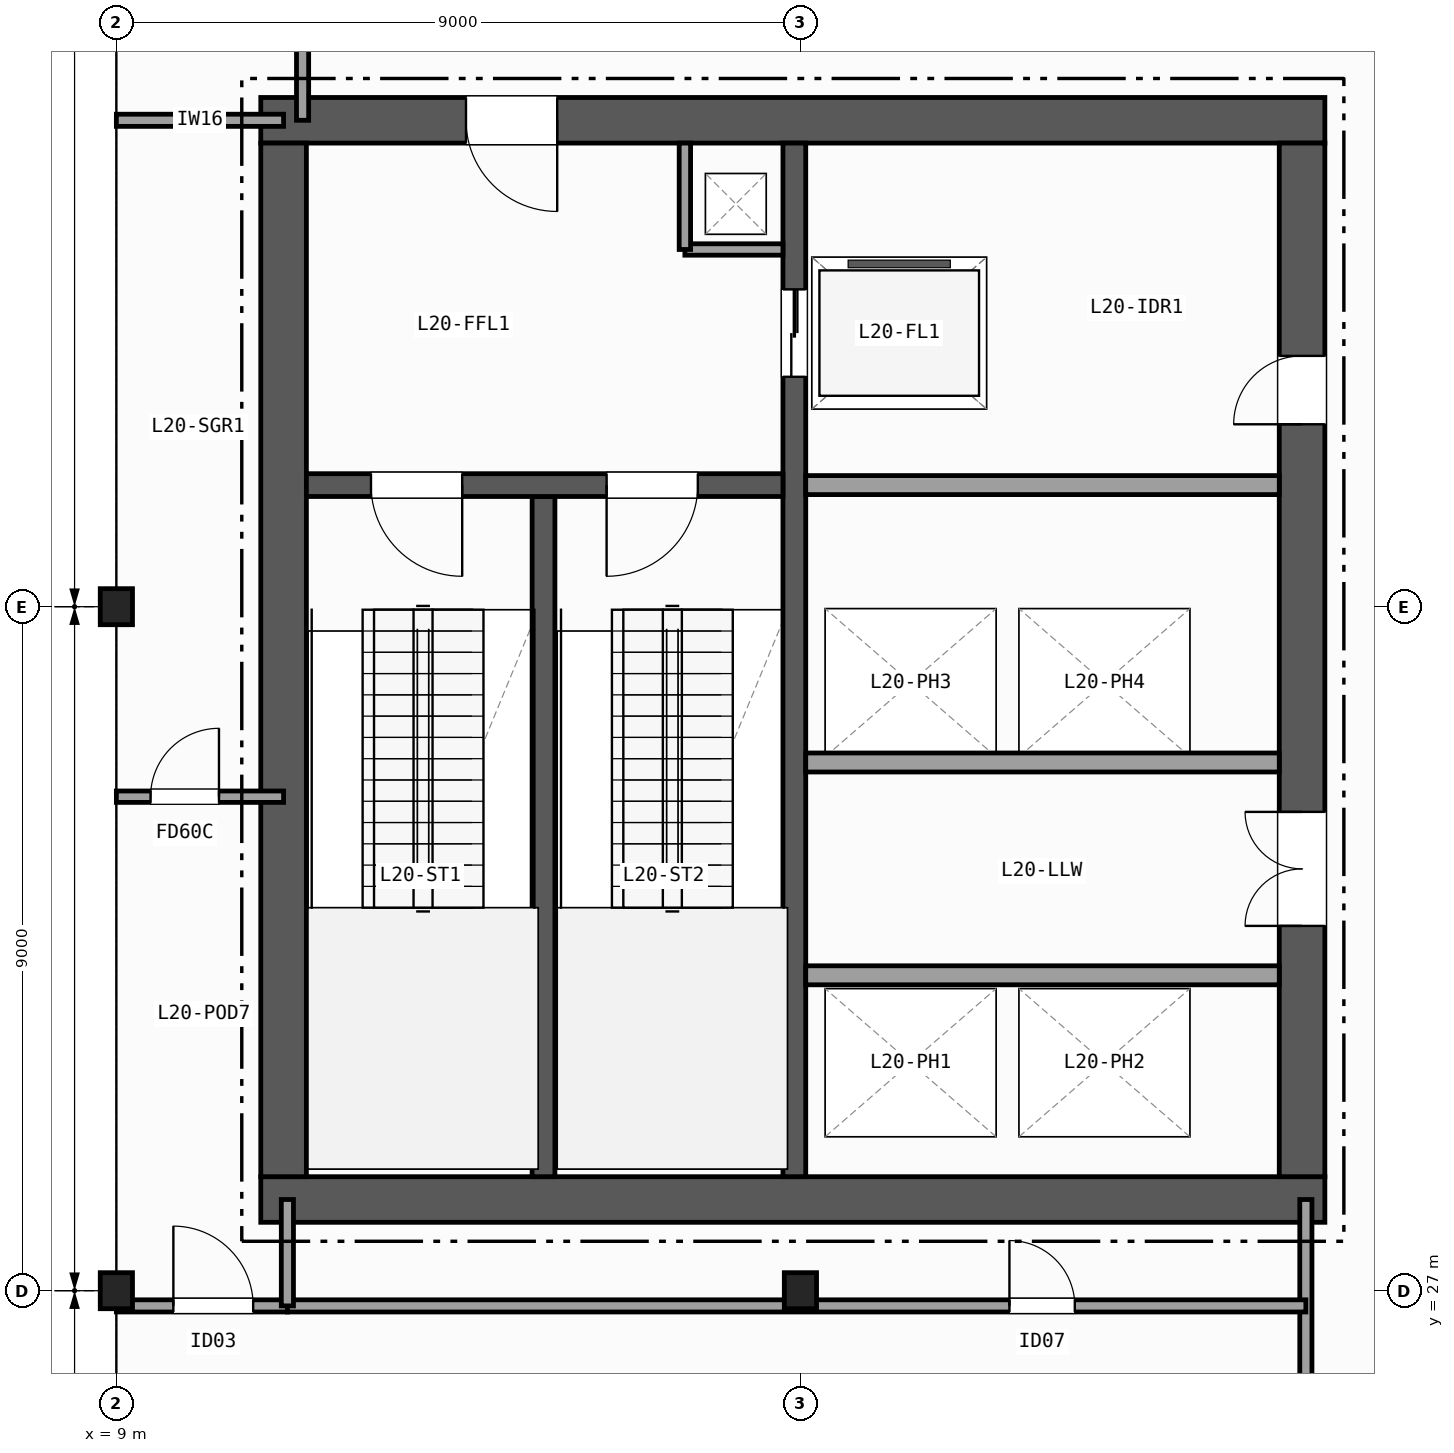
"""IFC4 building model, lengths in metres.
Left out: names, types, materials, properties, quantities, classifications, styles, units other than length and angle.
Written with IfcOpenShell. Run it as: python <this file> out.ifc"""

import sys

from ifc_helpers import new_model, si_unit, direction, frame, frame_2d, origin, origin_2d, place, context, subcontext, project, spatial, rectangle, i_section, extrude, element, fill, save


model = new_model("IFC4")
c1 = context("Model", 3, precision=1e-05, world=origin(), true_north=direction((0.0, 1.0)))
c2 = subcontext(c1, "Body", "Model", "MODEL_VIEW")
j1 = project(units=[si_unit("LENGTHUNIT", "METRE"), si_unit("PLANEANGLEUNIT", "RADIAN")], contexts=[c1])
p1 = place(None, origin())
s1 = spatial("IfcSite", under=j1, at=p1, CompositionType="ELEMENT")
p2 = place(p1, origin())
s2 = spatial("IfcBuilding", under=s1, at=p2, CompositionType="ELEMENT")
p3 = place(p2, frame((0.0, 0.0, 84.1)))
s3 = spatial("IfcBuildingStorey", under=s2, at=p3, CompositionType="ELEMENT", Elevation=84.1)
for number, where, z_axis, x_axis in (
    (1, (9.0, 27.0, 0.0), (0.0, 0.0, 1.0), (1.0, 0.0, 0.0)),
    (2, (9.0, 36.0, 0.0), (0.0, 0.0, 1.0), (1.0, 0.0, 0.0)),
    (3, (18.0, 27.0, 0.0), (0.0, 0.0, 1.0), (1.0, 0.0, 0.0)),
):
    element("IfcColumn", number, at=place(p3, frame(where, z_axis=z_axis, x_axis=x_axis)), inside=s3, PredefinedType="COLUMN", context=c2, shape_type="SweptSolid", body=[
        extrude(i_section(OverallWidth=0.424, OverallDepth=0.474, WebThickness=0.048, FlangeThickness=0.077, FilletRadius=0.015, at=origin_2d()), origin(), (0.0, 0.0, 1.0), 5.0),
    ])
p4 = place(p3, frame((10.9, 28.2, 0.0), z_axis=(0.0, 0.0, 1.0), x_axis=(1.0, 0.0, 0.0)))
e4 = element("IfcWall", 4, at=p4, inside=s3, PredefinedType="SHEAR", context=c2, shape_type="SweptSolid", body=[
    extrude(rectangle(XDim=14.0, YDim=0.6, at=frame_2d((7.0, 0.0))), origin(), (0.0, 0.0, 1.0), 4.72),
])
p5 = place(p3, frame((24.9, 42.4, 0.0), z_axis=(0.0, 0.0, 1.0), x_axis=(-1.0, 0.0, 0.0)))
e5 = element("IfcWall", 5, at=p5, inside=s3, PredefinedType="SHEAR", context=c2, shape_type="SweptSolid", body=[
    extrude(rectangle(XDim=14.0, YDim=0.6, at=frame_2d((7.0, 0.0))), origin(), (0.0, 0.0, 1.0), 4.72),
])
p6 = place(p5, frame((10.1, 0.0, 0.0)))
e6 = element("IfcOpeningElement", 6, at=p6, cuts=e5, PredefinedType="OPENING", context=c2, shape_type="SweptSolid", body=[
    extrude(rectangle(XDim=1.2, YDim=2.15, at=frame_2d((0.6, 1.075))), frame((0.0, 0.31, 0.0), z_axis=(0.0, -1.0, 0.0), x_axis=(1.0, 0.0, 0.0)), (0.0, 0.0, 1.0), 0.62),
])
p7 = place(p3, frame((11.2, 42.1, 0.0), z_axis=(0.0, 0.0, 1.0), x_axis=(0.0, -1.0, 0.0)))
e7 = element("IfcWall", 7, at=p7, inside=s3, PredefinedType="SHEAR", context=c2, shape_type="SweptSolid", body=[
    extrude(rectangle(XDim=13.6, YDim=0.6, at=frame_2d((6.8, 0.0))), origin(), (0.0, 0.0, 1.0), 4.72),
])
p8 = place(p3, frame((24.6, 28.5, 0.0), z_axis=(0.0, 0.0, 1.0), x_axis=(0.0, 1.0, 0.0)))
e8 = element("IfcWall", 8, at=p8, inside=s3, PredefinedType="SHEAR", context=c2, shape_type="SweptSolid", body=[
    extrude(rectangle(XDim=13.6, YDim=0.6, at=frame_2d((6.8, 0.0))), origin(), (0.0, 0.0, 1.0), 4.72),
])
p9 = place(p8, frame((3.3, 0.0, 0.0)))
e9 = element("IfcOpeningElement", 9, at=p9, cuts=e8, PredefinedType="OPENING", context=c2, shape_type="SweptSolid", body=[
    extrude(rectangle(XDim=1.5, YDim=2.2, at=frame_2d((0.75, 1.1))), frame((0.0, 0.31, 0.0), z_axis=(0.0, -1.0, 0.0), x_axis=(1.0, 0.0, 0.0)), (0.0, 0.0, 1.0), 0.62),
])
p10 = place(p8, frame((9.9, 0.0, 0.0)))
e10 = element("IfcOpeningElement", 10, at=p10, cuts=e8, PredefinedType="OPENING", context=c2, shape_type="SweptSolid", body=[
    extrude(rectangle(XDim=0.9, YDim=2.1, at=frame_2d((0.45, 1.05))), frame((0.0, 0.31, 0.0), z_axis=(0.0, -1.0, 0.0), x_axis=(1.0, 0.0, 0.0)), (0.0, 0.0, 1.0), 0.62),
])
p11 = place(p3, frame((14.62, 28.5, 0.0), z_axis=(0.0, 0.0, 1.0), x_axis=(0.0, 1.0, 0.0)))
e11 = element("IfcWall", 11, at=p11, inside=s3, PredefinedType="SHEAR", context=c2, shape_type="SweptSolid", body=[
    extrude(rectangle(XDim=8.95, YDim=0.3, at=frame_2d((4.475, 0.0))), origin(), (0.0, 0.0, 1.0), 4.72),
])
p12 = place(p3, frame((17.92, 42.1, 0.0), z_axis=(0.0, 0.0, 1.0), x_axis=(0.0, -1.0, 0.0)))
e12 = element("IfcWall", 12, at=p12, inside=s3, PredefinedType="SHEAR", context=c2, shape_type="SweptSolid", body=[
    extrude(rectangle(XDim=13.6, YDim=0.3, at=frame_2d((6.8, 0.0))), origin(), (0.0, 0.0, 1.0), 4.72),
])
p13 = place(p12, frame((1.925, 0.0, 0.0)))
e13 = element("IfcOpeningElement", 13, at=p13, cuts=e12, PredefinedType="OPENING", context=c2, shape_type="SweptSolid", body=[
    extrude(rectangle(XDim=1.15, YDim=2.15, at=frame_2d((0.575, 1.075))), frame((0.0, 0.16, 0.0), z_axis=(0.0, -1.0, 0.0), x_axis=(1.0, 0.0, 0.0)), (0.0, 0.0, 1.0), 0.32),
])
p14 = place(p3, frame((17.77, 37.6, 0.0), z_axis=(0.0, 0.0, 1.0), x_axis=(-1.0, 0.0, 0.0)))
e14 = element("IfcWall", 14, at=p14, inside=s3, PredefinedType="SHEAR", context=c2, shape_type="SweptSolid", body=[
    extrude(rectangle(XDim=6.27, YDim=0.3, at=frame_2d((3.135, 0.0))), origin(), (0.0, 0.0, 1.0), 4.72),
])
p15 = place(p14, frame((4.22, 0.0, 0.0)))
e15 = element("IfcOpeningElement", 15, at=p15, cuts=e14, PredefinedType="OPENING", context=c2, shape_type="SweptSolid", body=[
    extrude(rectangle(XDim=1.2, YDim=2.15, at=frame_2d((0.6, 1.075))), frame((0.0, 0.16, 0.0), z_axis=(0.0, -1.0, 0.0), x_axis=(1.0, 0.0, 0.0)), (0.0, 0.0, 1.0), 0.32),
])
p16 = place(p14, frame((1.12, 0.0, 0.0)))
e16 = element("IfcOpeningElement", 16, at=p16, cuts=e14, PredefinedType="OPENING", context=c2, shape_type="SweptSolid", body=[
    extrude(rectangle(XDim=1.2, YDim=2.15, at=frame_2d((0.6, 1.075))), frame((0.0, 0.16, 0.0), z_axis=(0.0, -1.0, 0.0), x_axis=(1.0, 0.0, 0.0)), (0.0, 0.0, 1.0), 0.32),
])
p17 = place(p3, frame((16.48, 40.7, 0.0), z_axis=(0.0, 0.0, 1.0), x_axis=(1.0, 0.0, 0.0)))
e17 = element("IfcWall", 17, at=p17, inside=s3, PredefinedType="PARTITIONING", context=c2, shape_type="SweptSolid", body=[
    extrude(rectangle(XDim=1.29, YDim=0.15, at=frame_2d((0.645, 0.0))), origin(), (0.0, 0.0, 1.0), 4.72),
])
p18 = place(p3, frame((16.48, 40.7, 0.0), z_axis=(0.0, 0.0, 1.0), x_axis=(0.0, 1.0, 0.0)))
e18 = element("IfcWall", 18, at=p18, inside=s3, PredefinedType="PARTITIONING", context=c2, shape_type="SweptSolid", body=[
    extrude(rectangle(XDim=1.4, YDim=0.15, at=frame_2d((0.7, 0.0))), origin(), (0.0, 0.0, 1.0), 4.72),
])
for number, where, z_axis, x_axis in (
    (19, (18.07, 37.6, 0.0), (0.0, 0.0, 1.0), (1.0, 0.0, 0.0)),
    (20, (18.07, 31.15, 0.0), (0.0, 0.0, 1.0), (1.0, 0.0, 0.0)),
    (21, (24.3, 33.95, 0.0), (0.0, 0.0, 1.0), (-1.0, 0.0, 0.0)),
):
    element("IfcWall", number, at=place(p3, frame(where, z_axis=z_axis, x_axis=x_axis)), inside=s3, PredefinedType="PARTITIONING", context=c2, shape_type="SweptSolid", body=[
        extrude(rectangle(XDim=6.23, YDim=0.25, at=frame_2d((3.115, 0.0))), origin(), (0.0, 0.0, 1.0), 4.72),
    ])
p19 = place(p3, frame((9.0, 26.8, 0.0), z_axis=(0.0, 0.0, 1.0), x_axis=(1.0, 0.0, 0.0)))
e22 = element("IfcWall", 22, at=p19, inside=s3, PredefinedType="PARTITIONING", context=c2, shape_type="SweptSolid", body=[
    extrude(rectangle(XDim=2.25, YDim=0.16, at=frame_2d((1.125, 0.0))), origin(), (0.0, 0.0, 1.0), 3.927),
])
p20 = place(p19, frame((0.75, 0.0, 0.0)))
e23 = element("IfcOpeningElement", 23, at=p20, cuts=e22, PredefinedType="OPENING", context=c2, shape_type="SweptSolid", body=[
    extrude(rectangle(XDim=1.05, YDim=2.15, at=frame_2d((0.525, 1.075))), frame((0.0, 0.09, 0.0), z_axis=(0.0, -1.0, 0.0), x_axis=(1.0, 0.0, 0.0)), (0.0, 0.0, 1.0), 0.18),
])
p21 = place(p3, frame((9.0, 42.4, 0.0), z_axis=(0.0, 0.0, 1.0), x_axis=(1.0, 0.0, 0.0)))
e24 = element("IfcWall", 24, at=p21, inside=s3, PredefinedType="PARTITIONING", context=c2, shape_type="SweptSolid", body=[
    extrude(rectangle(XDim=2.2, YDim=0.16, at=frame_2d((1.1, 0.0))), origin(), (0.0, 0.0, 1.0), 3.927),
])
p22 = place(p3, frame((11.45, 42.4, 0.0), z_axis=(0.0, 0.0, 1.0), x_axis=(0.0, 1.0, 0.0)))
e25 = element("IfcWall", 25, at=p22, inside=s3, PredefinedType="PARTITIONING", context=c2, shape_type="SweptSolid", body=[
    extrude(rectangle(XDim=2.1, YDim=0.16, at=frame_2d((1.05, 0.0))), origin(), (0.0, 0.0, 1.0), 4.72),
])
p23 = place(p3, frame((9.0, 33.5, 0.0), z_axis=(0.0, 0.0, 1.0), x_axis=(1.0, 0.0, 0.0)))
e26 = element("IfcWall", 26, at=p23, inside=s3, PredefinedType="PARTITIONING", context=c2, shape_type="SweptSolid", body=[
    extrude(rectangle(XDim=2.2, YDim=0.15, at=frame_2d((1.1, 0.0))), origin(), (0.0, 0.0, 1.0), 3.927),
])
p24 = place(p23, frame((0.45, 0.0, 0.0)))
e27 = element("IfcOpeningElement", 27, at=p24, cuts=e26, PredefinedType="OPENING", context=c2, shape_type="SweptSolid", body=[
    extrude(rectangle(XDim=0.9, YDim=2.1, at=frame_2d((0.45, 1.05))), frame((0.0, 0.085, 0.0), z_axis=(0.0, -1.0, 0.0), x_axis=(1.0, 0.0, 0.0)), (0.0, 0.0, 1.0), 0.17),
])
p25 = place(p3, frame((24.65, 9.0, 0.0), z_axis=(0.0, 0.0, 1.0), x_axis=(0.0, 1.0, 0.0)))
e28 = element("IfcWall", 28, at=p25, inside=s3, PredefinedType="PARTITIONING", context=c2, shape_type="SweptSolid", body=[
    extrude(rectangle(XDim=19.2, YDim=0.16, at=frame_2d((9.6, 0.0))), origin(), (0.0, 0.0, 1.0), 3.927),
])
p26 = place(p25, frame((12.2, 0.0, 0.0)))
e29 = element("IfcOpeningElement", 29, at=p26, cuts=e28, PredefinedType="OPENING", context=c2, shape_type="SweptSolid", body=[
    extrude(rectangle(XDim=0.95, YDim=2.1, at=frame_2d((0.475, 1.05))), frame((0.0, 0.09, 0.0), z_axis=(0.0, -1.0, 0.0), x_axis=(1.0, 0.0, 0.0)), (0.0, 0.0, 1.0), 0.18),
])
p27 = place(p25, frame((4.2, 0.0, 0.0)))
e30 = element("IfcOpeningElement", 30, at=p27, cuts=e28, PredefinedType="OPENING", context=c2, shape_type="SweptSolid", body=[
    extrude(rectangle(XDim=1.0, YDim=2.1, at=frame_2d((0.5, 1.05))), frame((0.0, 0.09, 0.0), z_axis=(0.0, -1.0, 0.0), x_axis=(1.0, 0.0, 0.0)), (0.0, 0.0, 1.0), 0.18),
])
p28 = place(p3, frame((11.25, 26.8, 0.0), z_axis=(0.0, 0.0, 1.0), x_axis=(1.0, 0.0, 0.0)))
e31 = element("IfcWall", 31, at=p28, inside=s3, PredefinedType="PARTITIONING", context=c2, shape_type="SweptSolid", body=[
    extrude(rectangle(XDim=13.4, YDim=0.16, at=frame_2d((6.7, 0.0))), origin(), (0.0, 0.0, 1.0), 4.089),
])
p29 = place(p28, frame((9.5, 0.0, 0.0)))
e32 = element("IfcOpeningElement", 32, at=p29, cuts=e31, PredefinedType="OPENING", context=c2, shape_type="SweptSolid", body=[
    extrude(rectangle(XDim=0.86, YDim=2.05, at=frame_2d((0.43, 1.025))), frame((0.0, 0.09, 0.0), z_axis=(0.0, -1.0, 0.0), x_axis=(1.0, 0.0, 0.0)), (0.0, 0.0, 1.0), 0.18),
])
p30 = place(p3, frame((11.25, 26.8, 0.0), z_axis=(0.0, 0.0, 1.0), x_axis=(0.0, 1.0, 0.0)))
e33 = element("IfcWall", 33, at=p30, inside=s3, PredefinedType="PARTITIONING", context=c2, shape_type="SweptSolid", body=[
    extrude(rectangle(XDim=1.4, YDim=0.16, at=frame_2d((0.7, 0.0))), origin(), (0.0, 0.0, 1.0), 4.089),
])
p31 = place(p15, origin())
e34 = element("IfcDoor", 34, at=p31, inside=s3, OperationType="SINGLE_SWING_LEFT", PredefinedType="DOOR", context=c2, shape_type="SweptSolid", body=[
    extrude(rectangle(XDim=1.2, YDim=2.15, at=frame_2d((0.6, 1.075))), frame((0.0, 0.025, 0.0), z_axis=(0.0, -1.0, 0.0), x_axis=(1.0, 0.0, 0.0)), (0.0, 0.0, 1.0), 0.05),
])
fill(e15, e34)
p32 = place(p16, origin())
e35 = element("IfcDoor", 35, at=p32, inside=s3, OperationType="SINGLE_SWING_RIGHT", PredefinedType="DOOR", context=c2, shape_type="SweptSolid", body=[
    extrude(rectangle(XDim=1.2, YDim=2.15, at=frame_2d((0.6, 1.075))), frame((0.0, 0.025, 0.0), z_axis=(0.0, -1.0, 0.0), x_axis=(1.0, 0.0, 0.0)), (0.0, 0.0, 1.0), 0.05),
])
fill(e16, e35)
p33 = place(p9, origin())
e36 = element("IfcDoor", 36, at=p33, inside=s3, OperationType="DOUBLE_DOOR_SINGLE_SWING", PredefinedType="DOOR", context=c2, shape_type="SweptSolid", body=[
    extrude(rectangle(XDim=1.5, YDim=2.2, at=frame_2d((0.75, 1.1))), frame((0.0, 0.025, 0.0), z_axis=(0.0, -1.0, 0.0), x_axis=(1.0, 0.0, 0.0)), (0.0, 0.0, 1.0), 0.05),
])
fill(e9, e36)
p34 = place(p6, origin())
e37 = element("IfcDoor", 37, at=p34, inside=s3, OperationType="SINGLE_SWING_LEFT", PredefinedType="DOOR", context=c2, shape_type="SweptSolid", body=[
    extrude(rectangle(XDim=1.2, YDim=2.15, at=frame_2d((0.6, 1.075))), frame((0.0, 0.025, 0.0), z_axis=(0.0, -1.0, 0.0), x_axis=(1.0, 0.0, 0.0)), (0.0, 0.0, 1.0), 0.05),
])
fill(e6, e37)
p35 = place(p10, origin())
e38 = element("IfcDoor", 38, at=p35, inside=s3, OperationType="SINGLE_SWING_LEFT", PredefinedType="DOOR", context=c2, shape_type="SweptSolid", body=[
    extrude(rectangle(XDim=0.9, YDim=2.1, at=frame_2d((0.45, 1.05))), frame((0.0, 0.025, 0.0), z_axis=(0.0, -1.0, 0.0), x_axis=(1.0, 0.0, 0.0)), (0.0, 0.0, 1.0), 0.05),
])
fill(e10, e38)
p36 = place(p13, origin())
e39 = element("IfcDoor", 39, at=p36, inside=s3, OperationType="DOUBLE_DOOR_SLIDING", PredefinedType="DOOR", context=c2, shape_type="SweptSolid", body=[
    extrude(rectangle(XDim=1.15, YDim=2.15, at=frame_2d((0.575, 1.075))), frame((0.0, 0.025, 0.0), z_axis=(0.0, -1.0, 0.0), x_axis=(1.0, 0.0, 0.0)), (0.0, 0.0, 1.0), 0.05),
])
fill(e13, e39)
p37 = place(p20, origin())
e40 = element("IfcDoor", 40, at=p37, inside=s3, OperationType="SINGLE_SWING_LEFT", PredefinedType="DOOR", context=c2, shape_type="SweptSolid", body=[
    extrude(rectangle(XDim=1.05, YDim=2.15, at=frame_2d((0.525, 1.075))), frame((0.0, 0.025, 0.0), z_axis=(0.0, -1.0, 0.0), x_axis=(1.0, 0.0, 0.0)), (0.0, 0.0, 1.0), 0.05),
])
fill(e23, e40)
p38 = place(p24, origin())
e41 = element("IfcDoor", 41, at=p38, inside=s3, OperationType="SINGLE_SWING_RIGHT", PredefinedType="DOOR", context=c2, shape_type="SweptSolid", body=[
    extrude(rectangle(XDim=0.9, YDim=2.1, at=frame_2d((0.45, 1.05))), frame((0.0, 0.025, 0.0), z_axis=(0.0, -1.0, 0.0), x_axis=(1.0, 0.0, 0.0)), (0.0, 0.0, 1.0), 0.05),
])
fill(e27, e41)
p39 = place(p29, origin())
e42 = element("IfcDoor", 42, at=p39, inside=s3, OperationType="SINGLE_SWING_LEFT", PredefinedType="DOOR", context=c2, shape_type="SweptSolid", body=[
    extrude(rectangle(XDim=0.86, YDim=2.05, at=frame_2d((0.43, 1.025))), frame((0.0, 0.025, 0.0), z_axis=(0.0, -1.0, 0.0), x_axis=(1.0, 0.0, 0.0)), (0.0, 0.0, 1.0), 0.05),
])
fill(e32, e42)
save(model, sys.argv[1])
